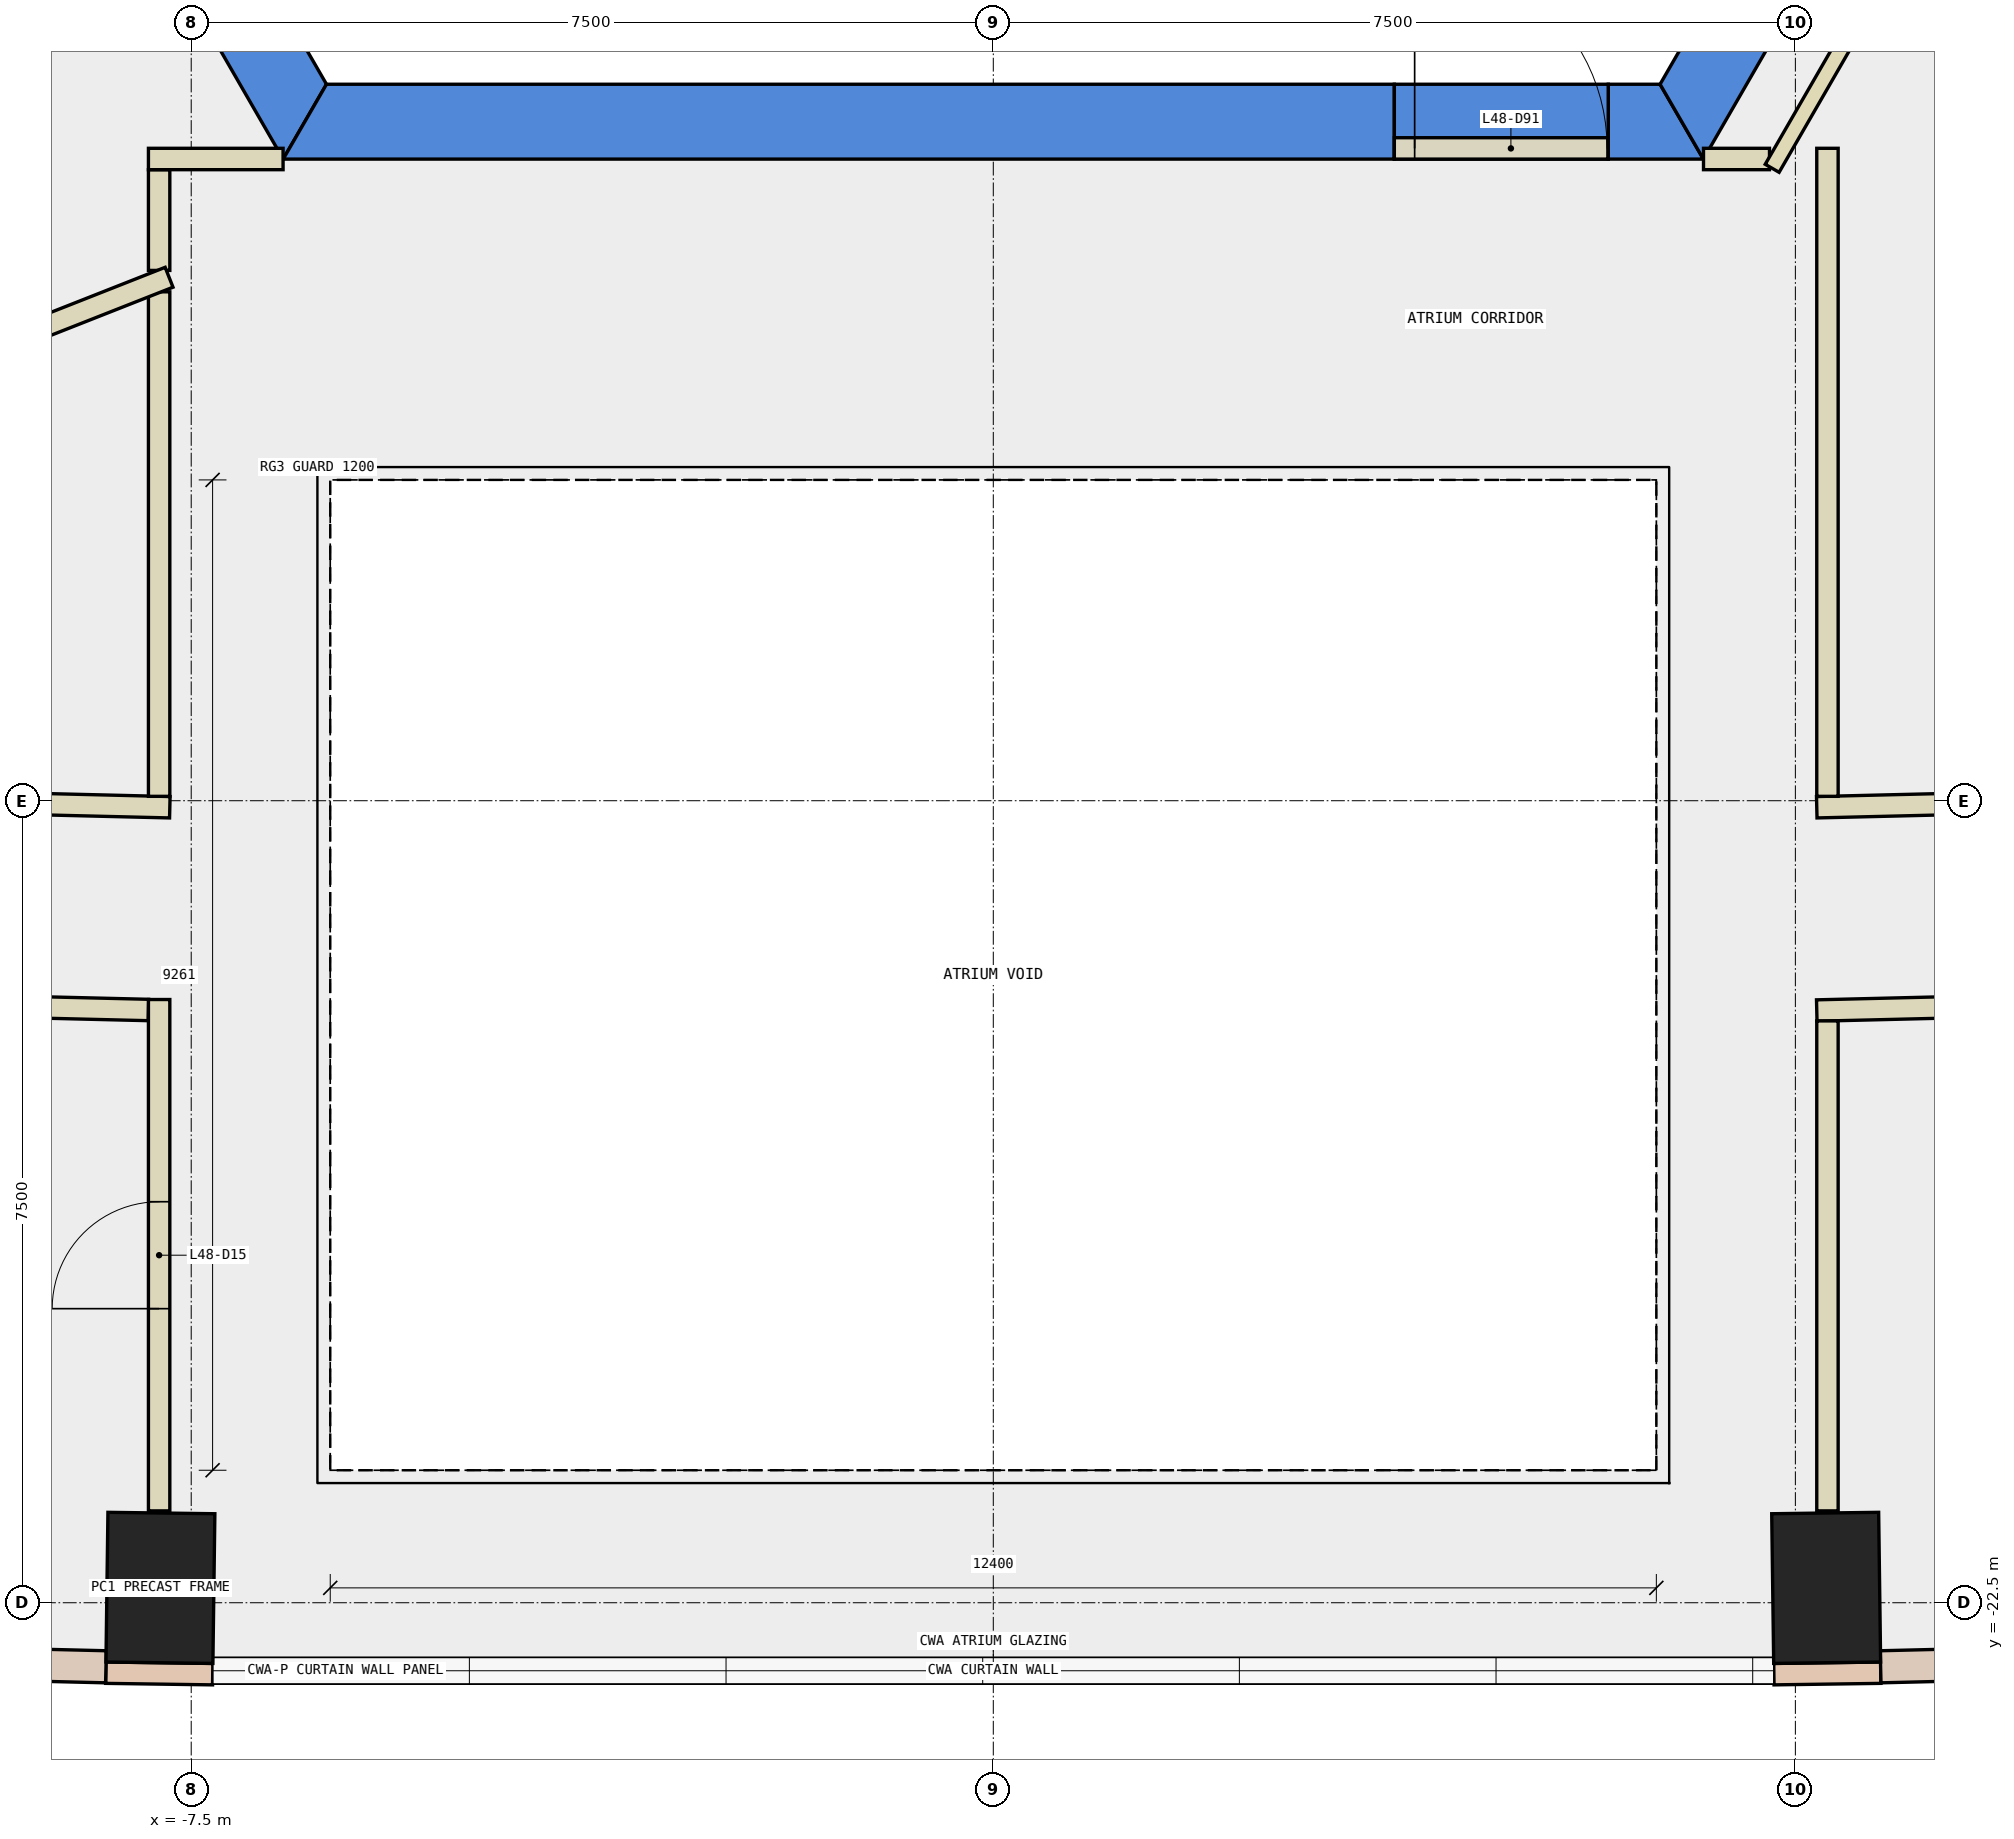
"""IFC4 building model, lengths in metres.
Left out: names, types, materials, properties, quantities, classifications, styles, units other than length and angle.
Written with IfcOpenShell. Run it as: python <this file> out.ifc"""

import sys

from ifc_helpers import new_model, si_unit, direction, frame, frame_2d, origin, origin_2d, place, context, subcontext, project, spatial, polyline, rectangle, outline, extrude, element, fill, save


model = new_model("IFC4")
c1 = context("Model", 3, precision=1e-05, world=origin(), true_north=direction((0.0, 1.0)))
c2 = subcontext(c1, "Body", "Model", "MODEL_VIEW")
j1 = project(units=[si_unit("LENGTHUNIT", "METRE"), si_unit("PLANEANGLEUNIT", "RADIAN")], contexts=[c1])
p1 = place(None, origin())
s1 = spatial("IfcSite", under=j1, at=p1, CompositionType="ELEMENT")
p2 = place(p1, origin())
s2 = spatial("IfcBuilding", under=s1, at=p2, CompositionType="ELEMENT")
p3 = place(p2, frame((0.0, 0.0, 215.0)))
s3 = spatial("IfcBuildingStorey", under=s2, at=p3, CompositionType="ELEMENT", Elevation=215.0)
for number, where, z_axis, x_axis in (
    (1, (-7.788, -22.361, -0.4), (0.0, 0.0, 1.0), (-1.0, 0.013, 0.0)),
    (2, (7.788, -22.361, -0.4), (0.0, 0.0, 1.0), (1.0, 0.013, 0.0)),
):
    element("IfcColumn", number, at=place(p3, frame(where, z_axis=z_axis, x_axis=x_axis)), inside=s3, PredefinedType="COLUMN", context=c2, shape_type="SweptSolid", body=[
        extrude(rectangle(XDim=1.0, YDim=1.4, at=origin_2d()), origin(), (0.0, 0.0, 1.0), 4.2),
    ])
p4 = place(p3, frame((0.0, 0.0, -0.4)))
e3 = element("IfcWall", 3, at=p4, inside=s3, PredefinedType="SHEAR", context=c2, shape_type="SweptSolid", body=[
    extrude(outline(polyline([(-13.279, 2.5), (-6.64, -9.0), (-6.235, -8.3), (-12.471, 2.5), (-13.279, 2.5)])), origin(), (0.0, 0.0, 1.0), 4.2),
])
p5 = place(p3, frame((0.0, 0.0, -0.4)))
e4 = element("IfcWall", 4, at=p5, inside=s3, PredefinedType="SHEAR", context=c2, shape_type="SweptSolid", body=[
    extrude(outline(polyline([(3.75, -9.0), (3.75, -8.3), (-6.235, -8.3), (-6.64, -9.0), (3.75, -9.0)])), origin(), (0.0, 0.0, 1.0), 4.2),
])
p6 = place(p3, frame((0.0, 0.0, -0.4)))
e5 = element("IfcWall", 5, at=p6, inside=s3, PredefinedType="SHEAR", context=c2, shape_type="SweptSolid", body=[
    extrude(outline(polyline([(5.75, -8.3), (5.75, -9.0), (6.64, -9.0), (6.235, -8.3), (5.75, -8.3)])), origin(), (0.0, 0.0, 1.0), 4.2),
])
p7 = place(p3, frame((0.0, 0.0, 3.6)))
e6 = element("IfcWall", 6, at=p7, inside=s3, PredefinedType="SHEAR", context=c2, shape_type="SweptSolid", body=[
    extrude(outline(polyline([(5.75, -9.0), (5.75, -8.3), (3.75, -8.3), (3.75, -9.0), (5.75, -9.0)])), origin(), (0.0, 0.0, 1.0), 0.2),
])
p8 = place(p3, frame((0.0, 0.0, -0.4)))
e7 = element("IfcWall", 7, at=p8, inside=s3, PredefinedType="SHEAR", context=c2, shape_type="SweptSolid", body=[
    extrude(outline(polyline([(6.64, -9.0), (13.279, 2.5), (12.471, 2.5), (6.235, -8.3), (6.64, -9.0)])), origin(), (0.0, 0.0, 1.0), 4.2),
])
for number, where, z_axis, x_axis in (
    (8, (8.877, -5.125, -0.4), (0.0, 0.0, 1.0), (0.866, -0.5, 0.0)),
    (9, (-8.877, -5.125, -0.4), (0.0, 0.0, 1.0), (-0.866, -0.5, 0.0)),
):
    element("IfcWall", number, at=place(p3, frame(where, z_axis=z_axis, x_axis=x_axis)), inside=s3, PredefinedType="SHEAR", context=c2, shape_type="SweptSolid", body=[
        extrude(rectangle(XDim=9.0, YDim=0.8, at=frame_2d((4.5, 0.0))), origin(), (0.0, 0.0, 1.0), 4.2),
    ])
for number, where, z_axis, x_axis in (
    (10, (-8.299, -23.154, 0.0), (0.0, 0.0, 1.0), (1.0, -0.014, 0.0)),
    (11, (7.299, -23.168, 0.0), (0.0, 0.0, 1.0), (1.0, 0.014, 0.0)),
):
    element("IfcWall", number, at=place(p3, frame(where, z_axis=z_axis, x_axis=x_axis)), inside=s3, PredefinedType="STANDARD", context=c2, shape_type="SweptSolid", body=[
        extrude(rectangle(XDim=1.0, YDim=0.2, at=frame_2d((0.5, 0.0))), origin(), (0.0, 0.0, 1.0), 3.8),
    ])
p9 = place(p3, frame((-13.681, -22.969, 0.0), z_axis=(0.0, 0.0, 1.0), x_axis=(0.999708030006, -0.024163086341, 0.0)))
e12 = element("IfcWall", 12, at=p9, inside=s3, PredefinedType="STANDARD", context=c2, shape_type="SweptSolid", body=[
    extrude(rectangle(XDim=5.385, YDim=0.3, at=frame_2d((2.693, 0.0))), origin(), (0.0, 0.0, 1.0), 3.8),
])
p10 = place(p9, frame((0.646, 0.0, 0.9)))
e13 = element("IfcOpeningElement", 13, at=p10, cuts=e12, PredefinedType="OPENING", context=c2, shape_type="SweptSolid", body=[
    extrude(rectangle(XDim=1.4, YDim=2.6, at=frame_2d((0.7, 1.3))), frame((0.0, 0.16, 0.0), z_axis=(0.0, -1.0, 0.0), x_axis=(1.0, 0.0, 0.0)), (0.0, 0.0, 1.0), 0.32),
])
p11 = place(p9, frame((3.339, 0.0, 0.9)))
e14 = element("IfcOpeningElement", 14, at=p11, cuts=e12, PredefinedType="OPENING", context=c2, shape_type="SweptSolid", body=[
    extrude(rectangle(XDim=1.4, YDim=2.6, at=frame_2d((0.7, 1.3))), frame((0.0, 0.16, 0.0), z_axis=(0.0, -1.0, 0.0), x_axis=(1.0, 0.0, 0.0)), (0.0, 0.0, 1.0), 0.32),
])
p12 = place(p3, frame((8.297, -23.099, 0.0), z_axis=(0.0, 0.0, 1.0), x_axis=(0.999708030006, 0.024163086341, 0.0)))
e15 = element("IfcWall", 15, at=p12, inside=s3, PredefinedType="STANDARD", context=c2, shape_type="SweptSolid", body=[
    extrude(rectangle(XDim=5.385, YDim=0.3, at=frame_2d((2.693, 0.0))), origin(), (0.0, 0.0, 1.0), 3.8),
])
p13 = place(p12, frame((0.646, 0.0, 0.9)))
e16 = element("IfcOpeningElement", 16, at=p13, cuts=e15, PredefinedType="OPENING", context=c2, shape_type="SweptSolid", body=[
    extrude(rectangle(XDim=1.4, YDim=2.6, at=frame_2d((0.7, 1.3))), frame((0.0, 0.16, 0.0), z_axis=(0.0, -1.0, 0.0), x_axis=(1.0, 0.0, 0.0)), (0.0, 0.0, 1.0), 0.32),
])
p14 = place(p12, frame((3.339, 0.0, 0.9)))
e17 = element("IfcOpeningElement", 17, at=p14, cuts=e15, PredefinedType="OPENING", context=c2, shape_type="SweptSolid", body=[
    extrude(rectangle(XDim=1.4, YDim=2.6, at=frame_2d((0.7, 1.3))), frame((0.0, 0.16, 0.0), z_axis=(0.0, -1.0, 0.0), x_axis=(1.0, 0.0, 0.0)), (0.0, 0.0, 1.0), 0.32),
])
p15 = place(p3, frame((7.7, -15.061, 0.0), z_axis=(0.0, 0.0, 1.0), x_axis=(0.999709615165, 0.024097413707, 0.0)))
e18 = element("IfcWall", 18, at=p15, inside=s3, PredefinedType="PARTITIONING", context=c2, shape_type="SweptSolid", body=[
    extrude(rectangle(XDim=6.231, YDim=0.2, at=frame_2d((3.115, 0.0))), origin(), (0.0, 0.0, 1.0), 3.8),
])
p16 = place(p15, frame((2.615, 0.0, 0.0)))
e19 = element("IfcOpeningElement", 19, at=p16, cuts=e18, PredefinedType="OPENING", context=c2, shape_type="SweptSolid", body=[
    extrude(rectangle(XDim=1.0, YDim=2.1, at=frame_2d((0.5, 1.05))), frame((0.0, 0.11, 0.0), z_axis=(0.0, -1.0, 0.0), x_axis=(1.0, 0.0, 0.0)), (0.0, 0.0, 1.0), 0.22),
])
p17 = place(p3, frame((-13.246, -14.927, 0.0), z_axis=(0.0, 0.0, 1.0), x_axis=(0.999708107757, -0.024159869312, 0.0)))
e20 = element("IfcWall", 20, at=p17, inside=s3, PredefinedType="PARTITIONING", context=c2, shape_type="SweptSolid", body=[
    extrude(rectangle(XDim=5.548, YDim=0.2, at=frame_2d((2.774, 0.0))), origin(), (0.0, 0.0, 1.0), 3.8),
])
p18 = place(p17, frame((2.274, 0.0, 0.0)))
e21 = element("IfcOpeningElement", 21, at=p18, cuts=e20, PredefinedType="OPENING", context=c2, shape_type="SweptSolid", body=[
    extrude(rectangle(XDim=1.0, YDim=2.1, at=frame_2d((0.5, 1.05))), frame((0.0, 0.11, 0.0), z_axis=(0.0, -1.0, 0.0), x_axis=(1.0, 0.0, 0.0)), (0.0, 0.0, 1.0), 0.22),
])
p19 = place(p3, frame((14.063, -16.808, 0.0), z_axis=(0.0, 0.0, 1.0), x_axis=(-0.999707980382, -0.024165139379, 0.0)))
e22 = element("IfcWall", 22, at=p19, inside=s3, PredefinedType="PARTITIONING", context=c2, shape_type="SweptSolid", body=[
    extrude(rectangle(XDim=6.365, YDim=0.2, at=frame_2d((3.183, 0.0))), origin(), (0.0, 0.0, 1.0), 3.8),
])
p20 = place(p19, frame((2.683, 0.0, 0.0)))
e23 = element("IfcOpeningElement", 23, at=p20, cuts=e22, PredefinedType="OPENING", context=c2, shape_type="SweptSolid", body=[
    extrude(rectangle(XDim=1.0, YDim=2.1, at=frame_2d((0.5, 1.05))), frame((0.0, 0.11, 0.0), z_axis=(0.0, -1.0, 0.0), x_axis=(1.0, 0.0, 0.0)), (0.0, 0.0, 1.0), 0.22),
])
p21 = place(p3, frame((-7.9, -16.957, 0.0), z_axis=(0.0, 0.0, 1.0), x_axis=(-0.999709338637, 0.024108883071, 0.0)))
e24 = element("IfcWall", 24, at=p21, inside=s3, PredefinedType="PARTITIONING", context=c2, shape_type="SweptSolid", body=[
    extrude(rectangle(XDim=2.866, YDim=0.2, at=frame_2d((1.433, 0.0))), origin(), (0.0, 0.0, 1.0), 3.8),
])
p22 = place(p3, frame((6.641, -8.999, 0.0), z_axis=(0.0, 0.0, 1.0), x_axis=(1.0, 0.0, 0.0)))
e25 = element("IfcWall", 25, at=p22, inside=s3, PredefinedType="PARTITIONING", context=c2, shape_type="SweptSolid", body=[
    extrude(rectangle(XDim=0.617, YDim=0.2, at=frame_2d((0.309, 0.0))), origin(), (0.0, 0.0, 1.0), 3.8),
])
p23 = place(p3, frame((7.283, -9.086, 0.0), z_axis=(0.0, 0.0, 1.0), x_axis=(0.500035303972, 0.866005020067, 0.0)))
e26 = element("IfcWall", 26, at=p23, inside=s3, PredefinedType="PARTITIONING", context=c2, shape_type="SweptSolid", body=[
    extrude(rectangle(XDim=3.828, YDim=0.15, at=frame_2d((1.914, 0.0))), origin(), (0.0, 0.0, 1.0), 3.8),
])
p24 = place(p3, frame((7.8, -8.899, 0.0), z_axis=(0.0, 0.0, 1.0), x_axis=(0.0, -1.0, 0.0)))
e27 = element("IfcWall", 27, at=p24, inside=s3, PredefinedType="PARTITIONING", context=c2, shape_type="SweptSolid", body=[
    extrude(rectangle(XDim=6.06, YDim=0.2, at=frame_2d((3.03, 0.0))), origin(), (0.0, 0.0, 1.0), 3.8),
])
p25 = place(p3, frame((-7.8, -10.041, 0.0), z_axis=(0.0, 0.0, 1.0), x_axis=(0.0, 1.0, 0.0)))
e28 = element("IfcWall", 28, at=p25, inside=s3, PredefinedType="PARTITIONING", context=c2, shape_type="SweptSolid", body=[
    extrude(rectangle(XDim=0.942, YDim=0.2, at=frame_2d((0.471, 0.0))), origin(), (0.0, 0.0, 1.0), 3.8),
])
p26 = place(p3, frame((-7.9, -8.999, 0.0), z_axis=(0.0, 0.0, 1.0), x_axis=(1.0, 0.0, 0.0)))
e29 = element("IfcWall", 29, at=p26, inside=s3, PredefinedType="PARTITIONING", context=c2, shape_type="SweptSolid", body=[
    extrude(rectangle(XDim=1.259, YDim=0.2, at=frame_2d((0.629, 0.0))), origin(), (0.0, 0.0, 1.0), 3.8),
])
p27 = place(p3, frame((-7.8, -14.959, 0.0), z_axis=(0.0, 0.0, 1.0), x_axis=(0.0, 1.0, 0.0)))
e30 = element("IfcWall", 30, at=p27, inside=s3, PredefinedType="PARTITIONING", context=c2, shape_type="SweptSolid", body=[
    extrude(rectangle(XDim=4.718, YDim=0.2, at=frame_2d((2.359, 0.0))), origin(), (0.0, 0.0, 1.0), 3.8),
])
p28 = place(p3, frame((7.8, -17.059, 0.0), z_axis=(0.0, 0.0, 1.0), x_axis=(0.0, -1.0, 0.0)))
e31 = element("IfcWall", 31, at=p28, inside=s3, PredefinedType="PARTITIONING", context=c2, shape_type="SweptSolid", body=[
    extrude(rectangle(XDim=4.582, YDim=0.2, at=frame_2d((2.291, 0.0))), origin(), (0.0, 0.0, 1.0), 3.8),
])
p29 = place(p3, frame((-7.8, -21.641, 0.0), z_axis=(0.0, 0.0, 1.0), x_axis=(0.0, 1.0, 0.0)))
e32 = element("IfcWall", 32, at=p29, inside=s3, PredefinedType="PARTITIONING", context=c2, shape_type="SweptSolid", body=[
    extrude(rectangle(XDim=4.782, YDim=0.2, at=frame_2d((2.391, 0.0))), origin(), (0.0, 0.0, 1.0), 3.8),
])
p30 = place(p29, frame((1.891, 0.0, 0.0)))
e33 = element("IfcOpeningElement", 33, at=p30, cuts=e32, PredefinedType="OPENING", context=c2, shape_type="SweptSolid", body=[
    extrude(rectangle(XDim=1.0, YDim=2.1, at=frame_2d((0.5, 1.05))), frame((0.0, 0.11, 0.0), z_axis=(0.0, -1.0, 0.0), x_axis=(1.0, 0.0, 0.0)), (0.0, 0.0, 1.0), 0.22),
])
p31 = place(p3, frame((-7.707, -10.105, 0.0), z_axis=(0.0, 0.0, 1.0), x_axis=(-0.930316800812, -0.36675693603, 0.0)))
e34 = element("IfcWall", 34, at=p31, inside=s3, PredefinedType="PARTITIONING", context=c2, shape_type="SweptSolid", body=[
    extrude(rectangle(XDim=7.302, YDim=0.2, at=frame_2d((3.651, 0.0))), origin(), (0.0, 0.0, 1.0), 3.8),
])
p32 = place(p3, frame((3.75, -8.9, 0.0), z_axis=(0.0, 0.0, 1.0), x_axis=(1.0, 0.0, 0.0)))
e35 = element("IfcWall", 35, at=p32, inside=s3, PredefinedType="PARTITIONING", context=c2, shape_type="SweptSolid", body=[
    extrude(rectangle(XDim=2.0, YDim=0.2, at=frame_2d((1.0, 0.0))), origin(), (0.0, 0.0, 1.0), 2.4),
])
p33 = place(p32, frame((0.19, 0.0, 0.0)))
e36 = element("IfcOpeningElement", 36, at=p33, cuts=e35, PredefinedType="OPENING", context=c2, shape_type="SweptSolid", body=[
    extrude(rectangle(XDim=1.8, YDim=2.1, at=frame_2d((0.9, 1.05))), frame((0.0, 0.11, 0.0), z_axis=(0.0, -1.0, 0.0), x_axis=(1.0, 0.0, 0.0)), (0.0, 0.0, 1.0), 0.22),
])
p34 = place(p30, origin())
e37 = element("IfcDoor", 37, at=p34, inside=s3, OperationType="SINGLE_SWING_LEFT", PredefinedType="DOOR", context=c2, shape_type="SweptSolid", body=[
    extrude(rectangle(XDim=1.0, YDim=2.1, at=frame_2d((0.5, 1.05))), frame((0.0, 0.025, 0.0), z_axis=(0.0, -1.0, 0.0), x_axis=(1.0, 0.0, 0.0)), (0.0, 0.0, 1.0), 0.05),
])
fill(e33, e37)
p35 = place(p33, origin())
e38 = element("IfcDoor", 38, at=p35, inside=s3, OperationType="DOUBLE_DOOR_SINGLE_SWING", PredefinedType="DOOR", context=c2, shape_type="SweptSolid", body=[
    extrude(rectangle(XDim=1.8, YDim=2.1, at=frame_2d((0.9, 1.05))), frame((0.0, 0.025, 0.0), z_axis=(0.0, -1.0, 0.0), x_axis=(1.0, 0.0, 0.0)), (0.0, 0.0, 1.0), 0.05),
])
fill(e36, e38)
save(model, sys.argv[1])
